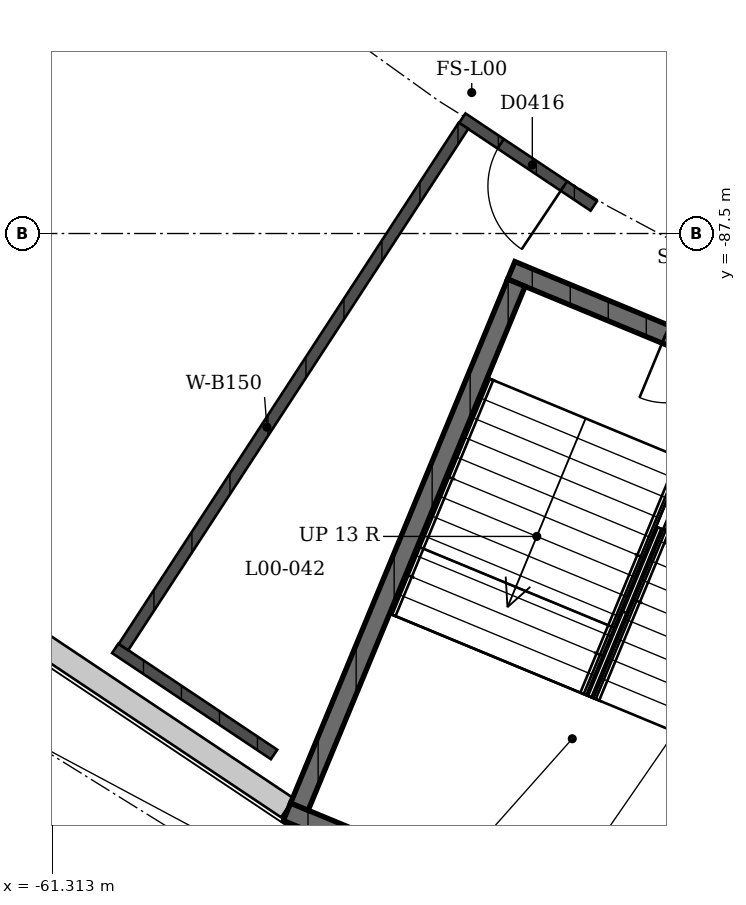
"""IFC4 building model, lengths in metres.
Left out: names, types, materials, properties, quantities, classifications, styles, units other than length and angle.
Written with IfcOpenShell. Run it as: python <this file> out.ifc"""

import sys

from ifc_helpers import new_model, si_unit, direction, frame, frame_2d, origin, place, context, subcontext, project, spatial, rectangle, extrude, element, fill, save


model = new_model("IFC4")
c1 = context("Model", 3, precision=1e-05, world=origin(), true_north=direction((0.0, 1.0)))
c2 = subcontext(c1, "Body", "Model", "MODEL_VIEW")
j1 = project(units=[si_unit("LENGTHUNIT", "METRE"), si_unit("PLANEANGLEUNIT", "RADIAN")], contexts=[c1])
p1 = place(None, origin())
s1 = spatial("IfcSite", under=j1, at=p1, CompositionType="ELEMENT")
p2 = place(p1, origin())
s2 = spatial("IfcBuilding", under=s1, at=p2, CompositionType="ELEMENT")
p3 = place(p2, origin())
s3 = spatial("IfcBuildingStorey", under=s2, at=p3, CompositionType="ELEMENT", Elevation=0.0)
p4 = place(p3, frame((-58.219, -95.056, 0.0), z_axis=(0.0, 0.0, 1.0), x_axis=(-0.831471306232, 0.555567697867, 0.0)))
e1 = element("IfcWall", 1, at=p4, inside=s3, PredefinedType="SOLIDWALL", context=c2, shape_type="SweptSolid", body=[
    extrude(rectangle(XDim=12.66, YDim=0.3, at=frame_2d((6.33, 0.0))), origin(), (0.0, 0.0, 1.0), 2.79),
])
p5 = place(p4, frame((4.349, 0.0, 0.0)))
e2 = element("IfcOpeningElement", 2, at=p5, cuts=e1, PredefinedType="OPENING", context=c2, shape_type="SweptSolid", body=[
    extrude(rectangle(XDim=3.0, YDim=2.4, at=frame_2d((1.5, 1.2))), frame((0.0, 0.16, 0.0), z_axis=(0.0, -1.0, 0.0), x_axis=(1.0, 0.0, 0.0)), (0.0, 0.0, 1.0), 0.32),
])
p6 = place(p3, frame((-55.274, -87.985, 0.0), z_axis=(0.0, 0.0, 1.0), x_axis=(0.923877480578, -0.382688386133, 0.0)))
e3 = element("IfcWall", 3, at=p6, inside=s3, PredefinedType="SHEAR", context=c2, shape_type="SweptSolid", body=[
    extrude(rectangle(XDim=12.15, YDim=0.25, at=frame_2d((6.075, 0.0))), origin(), (0.0, 0.0, 1.0), 4.09),
])
p7 = place(p6, frame((2.2, 0.0, 0.0)))
e4 = element("IfcOpeningElement", 4, at=p7, cuts=e3, PredefinedType="OPENING", context=c2, shape_type="SweptSolid", body=[
    extrude(rectangle(XDim=1.8, YDim=2.1, at=frame_2d((0.9, 1.05))), frame((0.0, 0.125, 0.0), z_axis=(0.0, -1.0, 0.0), x_axis=(1.0, 0.0, 0.0)), (0.0, 0.0, 1.0), 0.25),
])
p8 = place(p6, frame((8.15, 0.0, 0.0)))
e5 = element("IfcOpeningElement", 5, at=p8, cuts=e3, PredefinedType="OPENING", context=c2, shape_type="SweptSolid", body=[
    extrude(rectangle(XDim=1.8, YDim=2.1, at=frame_2d((0.9, 1.05))), frame((0.0, 0.125, 0.0), z_axis=(0.0, -1.0, 0.0), x_axis=(1.0, 0.0, 0.0)), (0.0, 0.0, 1.0), 0.25),
])
p9 = place(p3, frame((-58.224, -95.108, 0.0), z_axis=(0.0, 0.0, 1.0), x_axis=(0.923884584817, -0.382671234792, 0.0)))
e6 = element("IfcWall", 6, at=p9, inside=s3, PredefinedType="SHEAR", context=c2, shape_type="SweptSolid", body=[
    extrude(rectangle(XDim=12.15, YDim=0.25, at=frame_2d((6.075, 0.0))), origin(), (0.0, 0.0, 1.0), 4.09),
])
p10 = place(p3, frame((-55.206, -88.148, 0.0), z_axis=(0.0, 0.0, 1.0), x_axis=(-0.382664910245, -0.923887204407, 0.0)))
e7 = element("IfcWall", 7, at=p10, inside=s3, PredefinedType="SHEAR", context=c2, shape_type="SweptSolid", body=[
    extrude(rectangle(XDim=7.46, YDim=0.25, at=frame_2d((3.73, 0.0))), origin(), (0.0, 0.0, 1.0), 4.09),
])
p11 = place(p3, frame((-54.188, -87.138, 0.0), z_axis=(0.0, 0.0, 1.0), x_axis=(-0.831435859109, 0.555620744921, 0.0)))
e8 = element("IfcWall", 8, at=p11, inside=s3, PredefinedType="SOLIDWALL", context=c2, shape_type="SweptSolid", body=[
    extrude(rectangle(XDim=2.08, YDim=0.15, at=frame_2d((1.04, 0.0))), origin(), (0.0, 0.0, 1.0), 3.0),
])
p12 = place(p11, frame((0.472, 0.0, 0.0)))
e9 = element("IfcOpeningElement", 9, at=p12, cuts=e8, PredefinedType="OPENING", context=c2, shape_type="SweptSolid", body=[
    extrude(rectangle(XDim=1.0, YDim=2.1, at=frame_2d((0.5, 1.05))), frame((0.0, 0.075, 0.0), z_axis=(0.0, -1.0, 0.0), x_axis=(1.0, 0.0, 0.0)), (0.0, 0.0, 1.0), 0.15),
])
p13 = place(p3, frame((-58.394, -94.354, 0.0), z_axis=(0.0, 0.0, 1.0), x_axis=(-0.83145207432, 0.555596479569, 0.0)))
e10 = element("IfcWall", 10, at=p13, inside=s3, PredefinedType="SOLIDWALL", context=c2, shape_type="SweptSolid", body=[
    extrude(rectangle(XDim=2.513, YDim=0.15, at=frame_2d((1.257, 0.0))), origin(), (0.0, 0.0, 1.0), 3.0),
])
p14 = place(p3, frame((-55.902, -86.081, 0.0), z_axis=(0.0, 0.0, 1.0), x_axis=(-0.546272327191, -0.837607631618, 0.0)))
e11 = element("IfcWall", 11, at=p14, inside=s3, PredefinedType="SOLIDWALL", context=c2, shape_type="SweptSolid", body=[
    extrude(rectangle(XDim=8.19, YDim=0.15, at=frame_2d((4.095, 0.0))), origin(), (0.0, 0.0, 1.0), 3.0),
])
p15 = place(p7, origin())
e12 = element("IfcDoor", 12, at=p15, inside=s3, OperationType="DOUBLE_DOOR_SINGLE_SWING", PredefinedType="DOOR", context=c2, shape_type="SweptSolid", body=[
    extrude(rectangle(XDim=1.8, YDim=2.1, at=frame_2d((0.9, 1.05))), frame((0.0, 0.025, 0.0), z_axis=(0.0, -1.0, 0.0), x_axis=(1.0, 0.0, 0.0)), (0.0, 0.0, 1.0), 0.05),
])
fill(e4, e12)
p16 = place(p12, origin())
e13 = element("IfcDoor", 13, at=p16, inside=s3, OperationType="SINGLE_SWING_RIGHT", PredefinedType="DOOR", context=c2, shape_type="SweptSolid", body=[
    extrude(rectangle(XDim=1.0, YDim=2.1, at=frame_2d((0.5, 1.05))), frame((0.0, 0.025, 0.0), z_axis=(0.0, -1.0, 0.0), x_axis=(1.0, 0.0, 0.0)), (0.0, 0.0, 1.0), 0.05),
])
fill(e9, e13)
save(model, sys.argv[1])
